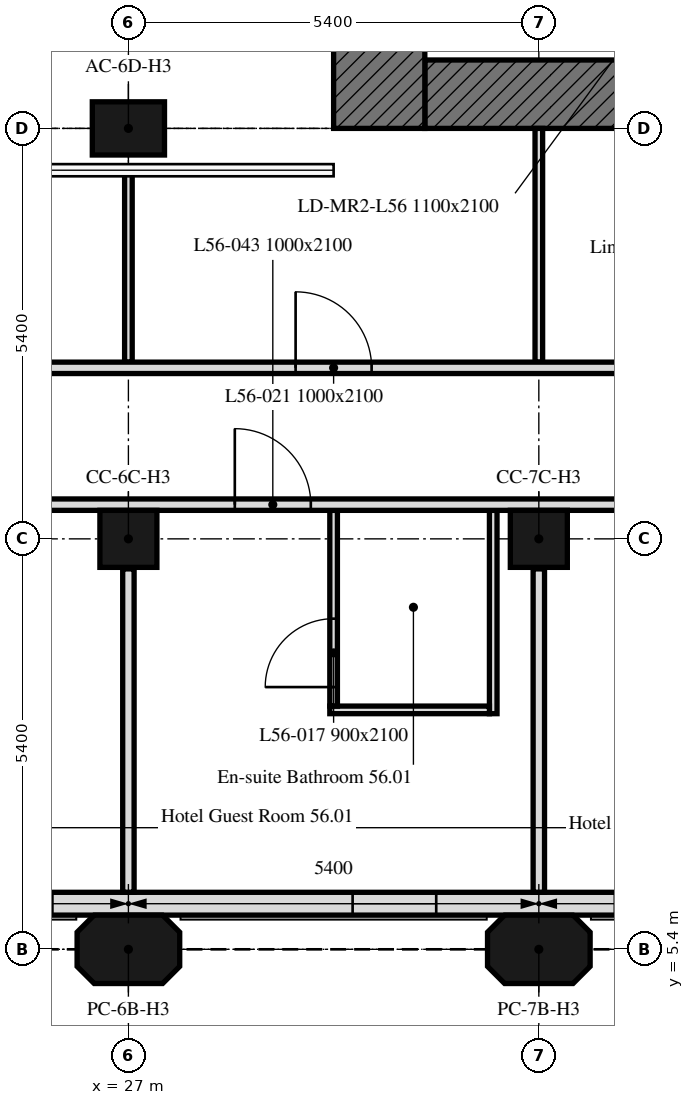
"""IFC4 building model, lengths in metres.
Left out: names, types, materials, properties, quantities, classifications, styles, units other than length and angle.
Written with IfcOpenShell. Run it as: python <this file> out.ifc"""

import sys

from ifc_helpers import new_model, si_unit, direction, frame, frame_2d, origin, origin_2d, place, context, subcontext, project, spatial, polyline, rectangle, outline, extrude, element, fill, save


model = new_model("IFC4")
c1 = context("Model", 3, precision=1e-05, world=origin(), true_north=direction((0.0, 1.0)))
c2 = subcontext(c1, "Body", "Model", "MODEL_VIEW")
j1 = project(units=[si_unit("LENGTHUNIT", "METRE"), si_unit("PLANEANGLEUNIT", "RADIAN")], contexts=[c1])
p1 = place(None, origin())
s1 = spatial("IfcSite", under=j1, at=p1, CompositionType="ELEMENT")
p2 = place(p1, origin())
s2 = spatial("IfcBuilding", under=s1, at=p2, CompositionType="ELEMENT")
p3 = place(p2, frame((0.0, 0.0, 223.6)))
s3 = spatial("IfcBuildingStorey", under=s2, at=p3, CompositionType="ELEMENT", Elevation=223.6)
for number, where, z_axis, x_axis in (
    (1, (27.0, 5.4, 0.0), (0.0, 0.0, 1.0), (1.0, 0.0, 0.0)),
    (2, (32.4, 5.4, 0.0), (0.0, 0.0, 1.0), (1.0, 0.0, 0.0)),
):
    element("IfcColumn", number, at=place(p3, frame(where, z_axis=z_axis, x_axis=x_axis)), inside=s3, PredefinedType="COLUMN", context=c2, shape_type="SweptSolid", body=[
        extrude(outline(polyline([(-0.45, -0.45), (0.45, -0.45), (0.675, -0.225), (0.675, 0.225), (0.45, 0.45), (-0.45, 0.45), (-0.675, 0.225), (-0.675, -0.225), (-0.45, -0.45)])), origin(), (0.0, 0.0, 1.0), 3.0),
    ])
for number, where, z_axis, x_axis in (
    (3, (27.0, 10.8, 0.0), (0.0, 0.0, 1.0), (1.0, 0.0, 0.0)),
    (4, (32.4, 10.8, 0.0), (0.0, 0.0, 1.0), (1.0, 0.0, 0.0)),
):
    element("IfcColumn", number, at=place(p3, frame(where, z_axis=z_axis, x_axis=x_axis)), inside=s3, PredefinedType="COLUMN", context=c2, shape_type="SweptSolid", body=[
        extrude(rectangle(XDim=0.75, YDim=0.75, at=origin_2d()), origin(), (0.0, 0.0, 1.0), 3.0),
    ])
p4 = place(p3, frame((27.0, 16.2, 0.0), z_axis=(0.0, 0.0, 1.0), x_axis=(1.0, 0.0, 0.0)))
e5 = element("IfcColumn", 5, at=p4, inside=s3, PredefinedType="COLUMN", context=c2, shape_type="SweptSolid", body=[
    extrude(rectangle(XDim=0.95, YDim=0.7, at=origin_2d()), origin(), (0.0, 0.0, 1.0), 3.0),
])
p5 = place(p3, frame((5.586, 6.0, 0.0), z_axis=(0.0, 0.0, 1.0), x_axis=(1.0, 0.0, 0.0)))
e6 = element("IfcWall", 6, at=p5, inside=s3, PredefinedType="SOLIDWALL", context=c2, shape_type="SweptSolid", body=[
    extrude(rectangle(XDim=32.027, YDim=0.3, at=frame_2d((16.014, 0.0))), origin(), (0.0, 0.0, 1.0), 3.0),
])
p6 = place(p5, frame((2.764, 0.0, 0.9)))
e7 = element("IfcOpeningElement", 7, at=p6, cuts=e6, PredefinedType="OPENING", context=c2, shape_type="SweptSolid", body=[
    extrude(rectangle(XDim=1.1, YDim=1.7, at=frame_2d((0.55, 0.85))), frame((0.0, 0.16, 0.0), z_axis=(0.0, -1.0, 0.0), x_axis=(1.0, 0.0, 0.0)), (0.0, 0.0, 1.0), 0.32),
])
p7 = place(p5, frame((6.214, 0.0, 0.9)))
e8 = element("IfcOpeningElement", 8, at=p7, cuts=e6, PredefinedType="OPENING", context=c2, shape_type="SweptSolid", body=[
    extrude(rectangle(XDim=3.4, YDim=1.7, at=frame_2d((1.7, 0.85))), frame((0.0, 0.16, 0.0), z_axis=(0.0, -1.0, 0.0), x_axis=(1.0, 0.0, 0.0)), (0.0, 0.0, 1.0), 0.32),
])
p8 = place(p5, frame((13.564, 0.0, 0.9)))
e9 = element("IfcOpeningElement", 9, at=p8, cuts=e6, PredefinedType="OPENING", context=c2, shape_type="SweptSolid", body=[
    extrude(rectangle(XDim=1.1, YDim=1.7, at=frame_2d((0.55, 0.85))), frame((0.0, 0.16, 0.0), z_axis=(0.0, -1.0, 0.0), x_axis=(1.0, 0.0, 0.0)), (0.0, 0.0, 1.0), 0.32),
])
p9 = place(p5, frame((17.014, 0.0, 0.9)))
e10 = element("IfcOpeningElement", 10, at=p9, cuts=e6, PredefinedType="OPENING", context=c2, shape_type="SweptSolid", body=[
    extrude(rectangle(XDim=3.4, YDim=1.7, at=frame_2d((1.7, 0.85))), frame((0.0, 0.16, 0.0), z_axis=(0.0, -1.0, 0.0), x_axis=(1.0, 0.0, 0.0)), (0.0, 0.0, 1.0), 0.32),
])
p10 = place(p5, frame((24.364, 0.0, 0.9)))
e11 = element("IfcOpeningElement", 11, at=p10, cuts=e6, PredefinedType="OPENING", context=c2, shape_type="SweptSolid", body=[
    extrude(rectangle(XDim=1.1, YDim=1.7, at=frame_2d((0.55, 0.85))), frame((0.0, 0.16, 0.0), z_axis=(0.0, -1.0, 0.0), x_axis=(1.0, 0.0, 0.0)), (0.0, 0.0, 1.0), 0.32),
])
p11 = place(p5, frame((27.814, 0.0, 0.9)))
e12 = element("IfcOpeningElement", 12, at=p11, cuts=e6, PredefinedType="OPENING", context=c2, shape_type="SweptSolid", body=[
    extrude(rectangle(XDim=3.4, YDim=1.7, at=frame_2d((1.7, 0.85))), frame((0.0, 0.16, 0.0), z_axis=(0.0, -1.0, 0.0), x_axis=(1.0, 0.0, 0.0)), (0.0, 0.0, 1.0), 0.32),
])
p12 = place(p3, frame((42.0, 16.65, 0.0), z_axis=(0.0, 0.0, 1.0), x_axis=(-1.0, 0.0, 0.0)))
e13 = element("IfcWall", 13, at=p12, inside=s3, PredefinedType="SOLIDWALL", context=c2, shape_type="SweptSolid", body=[
    extrude(rectangle(XDim=11.1, YDim=0.9, at=frame_2d((5.55, 0.0))), origin(), (0.0, 0.0, 1.0), 3.0),
])
p13 = place(p12, frame((3.55, 0.0, 0.0)))
e14 = element("IfcOpeningElement", 14, at=p13, cuts=e13, PredefinedType="OPENING", context=c2, shape_type="SweptSolid", body=[
    extrude(rectangle(XDim=2.0, YDim=2.4, at=frame_2d((1.0, 1.2))), frame((0.0, 0.45, 0.0), z_axis=(0.0, -1.0, 0.0), x_axis=(1.0, 0.0, 0.0)), (0.0, 0.0, 1.0), 0.9),
])
p14 = place(p3, frame((30.3, 16.2, 0.0), z_axis=(0.0, 0.0, 1.0), x_axis=(0.0, 1.0, 0.0)))
e15 = element("IfcWall", 15, at=p14, inside=s3, PredefinedType="SOLIDWALL", context=c2, shape_type="SweptSolid", body=[
    extrude(rectangle(XDim=16.2, YDim=1.2, at=frame_2d((8.1, 0.0))), origin(), (0.0, 0.0, 1.0), 3.0),
])
p15 = place(p3, frame((32.4, 10.405, 0.0), z_axis=(0.0, 0.0, 1.0), x_axis=(0.0, -1.0, 0.0)))
e16 = element("IfcWall", 16, at=p15, inside=s3, PredefinedType="PARTITIONING", context=c2, shape_type="SweptSolid", body=[
    extrude(rectangle(XDim=4.254, YDim=0.15, at=frame_2d((2.127, 0.0))), origin(), (0.0, 0.0, 1.0), 3.0),
])
p16 = place(p3, frame((31.8, 11.175, 0.0), z_axis=(0.0, 0.0, 1.0), x_axis=(0.0, -1.0, 0.0)))
e17 = element("IfcWall", 17, at=p16, inside=s3, PredefinedType="PARTITIONING", context=c2, shape_type="SweptSolid", body=[
    extrude(rectangle(XDim=2.675, YDim=0.1, at=frame_2d((1.337, 0.0))), origin(), (0.0, 0.0, 1.0), 3.0),
])
p17 = place(p3, frame((31.75, 8.55, 0.0), z_axis=(0.0, 0.0, 1.0), x_axis=(-1.0, 0.0, 0.0)))
e18 = element("IfcWall", 18, at=p17, inside=s3, PredefinedType="PARTITIONING", context=c2, shape_type="SweptSolid", body=[
    extrude(rectangle(XDim=2.1, YDim=0.1, at=frame_2d((1.05, 0.0))), origin(), (0.0, 0.0, 1.0), 3.0),
])
p18 = place(p3, frame((29.7, 8.6, 0.0), z_axis=(0.0, 0.0, 1.0), x_axis=(0.0, 1.0, 0.0)))
e19 = element("IfcWall", 19, at=p18, inside=s3, PredefinedType="PARTITIONING", context=c2, shape_type="SweptSolid", body=[
    extrude(rectangle(XDim=2.575, YDim=0.1, at=frame_2d((1.288, 0.0))), origin(), (0.0, 0.0, 1.0), 3.0),
])
p19 = place(p18, frame((0.25, 0.0, 0.0)))
e20 = element("IfcOpeningElement", 20, at=p19, cuts=e19, PredefinedType="OPENING", context=c2, shape_type="SweptSolid", body=[
    extrude(rectangle(XDim=0.9, YDim=2.1, at=frame_2d((0.45, 1.05))), frame((0.0, 0.05, 0.0), z_axis=(0.0, -1.0, 0.0), x_axis=(1.0, 0.0, 0.0)), (0.0, 0.0, 1.0), 0.1),
])
p20 = place(p3, frame((27.0, 10.405, 0.0), z_axis=(0.0, 0.0, 1.0), x_axis=(0.0, -1.0, 0.0)))
e21 = element("IfcWall", 21, at=p20, inside=s3, PredefinedType="PARTITIONING", context=c2, shape_type="SweptSolid", body=[
    extrude(rectangle(XDim=4.254, YDim=0.15, at=frame_2d((2.127, 0.0))), origin(), (0.0, 0.0, 1.0), 3.0),
])
p21 = place(p3, frame((0.751, 11.25, 0.0), z_axis=(0.0, 0.0, 1.0), x_axis=(1.0, 0.0, 0.0)))
e22 = element("IfcWall", 22, at=p21, inside=s3, PredefinedType="PARTITIONING", context=c2, shape_type="SweptSolid", body=[
    extrude(rectangle(XDim=41.698, YDim=0.15, at=frame_2d((20.849, 0.0))), origin(), (0.0, 0.0, 1.0), 3.0),
])
p22 = place(p21, frame((39.249, 0.0, 0.0)))
e23 = element("IfcOpeningElement", 23, at=p22, cuts=e22, PredefinedType="OPENING", context=c2, shape_type="SweptSolid", body=[
    extrude(rectangle(XDim=1.0, YDim=2.1, at=frame_2d((0.5, 1.05))), frame((0.0, 0.075, 0.0), z_axis=(0.0, -1.0, 0.0), x_axis=(1.0, 0.0, 0.0)), (0.0, 0.0, 1.0), 0.15),
])
p23 = place(p21, frame((27.649, 0.0, 0.0)))
e24 = element("IfcOpeningElement", 24, at=p23, cuts=e22, PredefinedType="OPENING", context=c2, shape_type="SweptSolid", body=[
    extrude(rectangle(XDim=1.0, YDim=2.1, at=frame_2d((0.5, 1.05))), frame((0.0, 0.075, 0.0), z_axis=(0.0, -1.0, 0.0), x_axis=(1.0, 0.0, 0.0)), (0.0, 0.0, 1.0), 0.15),
])
p24 = place(p21, frame((23.049, 0.0, 0.0)))
e25 = element("IfcOpeningElement", 25, at=p24, cuts=e22, PredefinedType="OPENING", context=c2, shape_type="SweptSolid", body=[
    extrude(rectangle(XDim=1.0, YDim=2.1, at=frame_2d((0.5, 1.05))), frame((0.0, 0.075, 0.0), z_axis=(0.0, -1.0, 0.0), x_axis=(1.0, 0.0, 0.0)), (0.0, 0.0, 1.0), 0.15),
])
p25 = place(p21, frame((11.449, 0.0, 0.0)))
e26 = element("IfcOpeningElement", 26, at=p25, cuts=e22, PredefinedType="OPENING", context=c2, shape_type="SweptSolid", body=[
    extrude(rectangle(XDim=1.0, YDim=2.1, at=frame_2d((0.5, 1.05))), frame((0.0, 0.075, 0.0), z_axis=(0.0, -1.0, 0.0), x_axis=(1.0, 0.0, 0.0)), (0.0, 0.0, 1.0), 0.15),
])
p26 = place(p21, frame((2.744, 0.0, 0.0)))
e27 = element("IfcOpeningElement", 27, at=p26, cuts=e22, PredefinedType="OPENING", context=c2, shape_type="SweptSolid", body=[
    extrude(rectangle(XDim=1.0, YDim=2.1, at=frame_2d((0.5, 1.05))), frame((0.0, 0.075, 0.0), z_axis=(0.0, -1.0, 0.0), x_axis=(1.0, 0.0, 0.0)), (0.0, 0.0, 1.0), 0.15),
])
p27 = place(p3, frame((32.4, 13.125, 0.0), z_axis=(0.0, 0.0, 1.0), x_axis=(0.0, 1.0, 0.0)))
e28 = element("IfcWall", 28, at=p27, inside=s3, PredefinedType="PARTITIONING", context=c2, shape_type="SweptSolid", body=[
    extrude(rectangle(XDim=3.075, YDim=0.1, at=frame_2d((1.538, 0.0))), origin(), (0.0, 0.0, 1.0), 3.0),
])
p28 = place(p3, frame((27.0, 15.705, 0.0), z_axis=(0.0, 0.0, 1.0), x_axis=(0.0, -1.0, 0.0)))
e29 = element("IfcWall", 29, at=p28, inside=s3, PredefinedType="PARTITIONING", context=c2, shape_type="SweptSolid", body=[
    extrude(rectangle(XDim=2.58, YDim=0.1, at=frame_2d((1.29, 0.0))), origin(), (0.0, 0.0, 1.0), 3.0),
])
p29 = place(p3, frame((5.325, 13.05, 0.0), z_axis=(0.0, 0.0, 1.0), x_axis=(1.0, 0.0, 0.0)))
e30 = element("IfcWall", 30, at=p29, inside=s3, PredefinedType="PARTITIONING", context=c2, shape_type="SweptSolid", body=[
    extrude(rectangle(XDim=37.124, YDim=0.15, at=frame_2d((18.562, 0.0))), origin(), (0.0, 0.0, 1.0), 3.0),
])
p30 = place(p29, frame((23.875, 0.0, 0.0)))
e31 = element("IfcOpeningElement", 31, at=p30, cuts=e30, PredefinedType="OPENING", context=c2, shape_type="SweptSolid", body=[
    extrude(rectangle(XDim=1.0, YDim=2.1, at=frame_2d((0.5, 1.05))), frame((0.0, 0.075, 0.0), z_axis=(0.0, -1.0, 0.0), x_axis=(1.0, 0.0, 0.0)), (0.0, 0.0, 1.0), 0.15),
])
p31 = place(p29, frame((13.475, 0.0, 0.0)))
e32 = element("IfcOpeningElement", 32, at=p31, cuts=e30, PredefinedType="OPENING", context=c2, shape_type="SweptSolid", body=[
    extrude(rectangle(XDim=1.0, YDim=2.1, at=frame_2d((0.5, 1.05))), frame((0.0, 0.075, 0.0), z_axis=(0.0, -1.0, 0.0), x_axis=(1.0, 0.0, 0.0)), (0.0, 0.0, 1.0), 0.15),
])
p32 = place(p29, frame((34.095, 0.0, 0.0)))
e33 = element("IfcOpeningElement", 33, at=p32, cuts=e30, PredefinedType="OPENING", context=c2, shape_type="SweptSolid", body=[
    extrude(rectangle(XDim=1.0, YDim=2.1, at=frame_2d((0.5, 1.05))), frame((0.0, 0.075, 0.0), z_axis=(0.0, -1.0, 0.0), x_axis=(1.0, 0.0, 0.0)), (0.0, 0.0, 1.0), 0.15),
])
p33 = place(p29, frame((8.337, 0.0, 0.0)))
e34 = element("IfcOpeningElement", 34, at=p33, cuts=e30, PredefinedType="OPENING", context=c2, shape_type="SweptSolid", body=[
    extrude(rectangle(XDim=1.0, YDim=2.1, at=frame_2d((0.5, 1.05))), frame((0.0, 0.075, 0.0), z_axis=(0.0, -1.0, 0.0), x_axis=(1.0, 0.0, 0.0)), (0.0, 0.0, 1.0), 0.15),
])
p34 = place(p29, frame((1.648, 0.0, 0.0)))
e35 = element("IfcOpeningElement", 35, at=p34, cuts=e30, PredefinedType="OPENING", context=c2, shape_type="SweptSolid", body=[
    extrude(rectangle(XDim=1.0, YDim=2.1, at=frame_2d((0.5, 1.05))), frame((0.0, 0.075, 0.0), z_axis=(0.0, -1.0, 0.0), x_axis=(1.0, 0.0, 0.0)), (0.0, 0.0, 1.0), 0.15),
])
p35 = place(p29, frame((28.613, 0.0, 0.0)))
e36 = element("IfcOpeningElement", 36, at=p35, cuts=e30, PredefinedType="OPENING", context=c2, shape_type="SweptSolid", body=[
    extrude(rectangle(XDim=1.0, YDim=2.1, at=frame_2d((0.5, 1.05))), frame((0.0, 0.075, 0.0), z_axis=(0.0, -1.0, 0.0), x_axis=(1.0, 0.0, 0.0)), (0.0, 0.0, 1.0), 0.15),
])
p36 = place(p29, frame((30.625, 0.0, 0.0)))
e37 = element("IfcOpeningElement", 37, at=p36, cuts=e30, PredefinedType="OPENING", context=c2, shape_type="SweptSolid", body=[
    extrude(rectangle(XDim=1.8, YDim=2.4, at=frame_2d((0.9, 1.2))), frame((0.0, 0.075, 0.0), z_axis=(0.0, -1.0, 0.0), x_axis=(1.0, 0.0, 0.0)), (0.0, 0.0, 1.0), 0.15),
])
p37 = place(p29, frame((5.525, 0.0, 0.0)))
e38 = element("IfcOpeningElement", 38, at=p37, cuts=e30, PredefinedType="OPENING", context=c2, shape_type="SweptSolid", body=[
    extrude(rectangle(XDim=1.8, YDim=2.4, at=frame_2d((0.9, 1.2))), frame((0.0, 0.075, 0.0), z_axis=(0.0, -1.0, 0.0), x_axis=(1.0, 0.0, 0.0)), (0.0, 0.0, 1.0), 0.15),
])
p38 = place(p10, origin())
e39 = element("IfcWindow", 39, at=p38, inside=s3, PartitioningType="SINGLE_PANEL", PredefinedType="WINDOW", context=c2, shape_type="SweptSolid", body=[
    extrude(rectangle(XDim=1.1, YDim=1.7, at=frame_2d((0.55, 0.85))), frame((0.0, 0.03, 0.0), z_axis=(0.0, -1.0, 0.0), x_axis=(1.0, 0.0, 0.0)), (0.0, 0.0, 1.0), 0.06),
])
fill(e11, e39)
p39 = place(p19, origin())
e40 = element("IfcDoor", 40, at=p39, inside=s3, OperationType="SINGLE_SWING_RIGHT", PredefinedType="DOOR", context=c2, shape_type="SweptSolid", body=[
    extrude(rectangle(XDim=0.9, YDim=2.1, at=frame_2d((0.45, 1.05))), frame((0.0, 0.025, 0.0), z_axis=(0.0, -1.0, 0.0), x_axis=(1.0, 0.0, 0.0)), (0.0, 0.0, 1.0), 0.05),
])
fill(e20, e40)
p40 = place(p30, origin())
e41 = element("IfcDoor", 41, at=p40, inside=s3, OperationType="SINGLE_SWING_LEFT", PredefinedType="DOOR", context=c2, shape_type="SweptSolid", body=[
    extrude(rectangle(XDim=1.0, YDim=2.1, at=frame_2d((0.5, 1.05))), frame((0.0, 0.025, 0.0), z_axis=(0.0, -1.0, 0.0), x_axis=(1.0, 0.0, 0.0)), (0.0, 0.0, 1.0), 0.05),
])
fill(e31, e41)
p41 = place(p23, origin())
e42 = element("IfcDoor", 42, at=p41, inside=s3, OperationType="SINGLE_SWING_LEFT", PredefinedType="DOOR", context=c2, shape_type="SweptSolid", body=[
    extrude(rectangle(XDim=1.0, YDim=2.1, at=frame_2d((0.5, 1.05))), frame((0.0, 0.025, 0.0), z_axis=(0.0, -1.0, 0.0), x_axis=(1.0, 0.0, 0.0)), (0.0, 0.0, 1.0), 0.05),
])
fill(e24, e42)
save(model, sys.argv[1])
